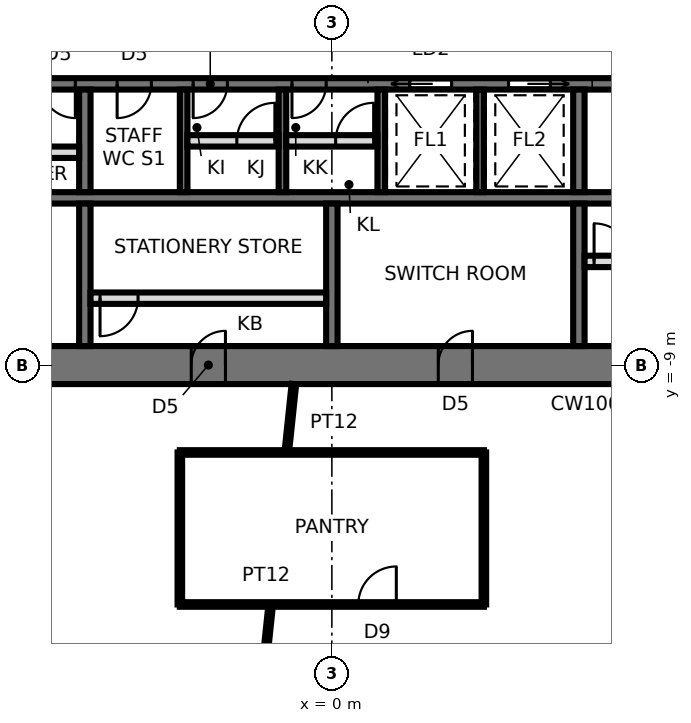
"""IFC4 building model, lengths in metres.
Left out: names, types, materials, properties, quantities, classifications, styles, units other than length and angle.
Written with IfcOpenShell. Run it as: python <this file> out.ifc"""

import sys

from ifc_helpers import new_model, si_unit, direction, frame, frame_2d, origin, place, context, subcontext, project, spatial, rectangle, extrude, element, fill, save


model = new_model("IFC4")
c1 = context("Model", 3, precision=1e-05, world=origin(), true_north=direction((0.0, 1.0)))
c2 = subcontext(c1, "Body", "Model", "MODEL_VIEW")
j1 = project(units=[si_unit("LENGTHUNIT", "METRE"), si_unit("PLANEANGLEUNIT", "RADIAN")], contexts=[c1])
p1 = place(None, origin())
s1 = spatial("IfcSite", under=j1, at=p1, CompositionType="ELEMENT")
p2 = place(p1, origin())
s2 = spatial("IfcBuilding", under=s1, at=p2, CompositionType="ELEMENT")
p3 = place(p2, frame((0.0, 0.0, 251.8)))
s3 = spatial("IfcBuildingStorey", under=s2, at=p3, CompositionType="ELEMENT", Elevation=251.8)
p4 = place(p3, frame((-13.2, -9.0, 0.0), z_axis=(0.0, 0.0, 1.0), x_axis=(1.0, 0.0, 0.0)))
e1 = element("IfcWall", 1, at=p4, inside=s3, PredefinedType="SHEAR", context=c2, shape_type="SweptSolid", body=[
    extrude(rectangle(XDim=26.4, YDim=1.0, at=frame_2d((13.2, 0.0))), origin(), (0.0, 0.0, 1.0), 4.2),
])
p5 = place(p4, frame((2.65, 0.0, 0.0)))
e2 = element("IfcOpeningElement", 2, at=p5, cuts=e1, PredefinedType="OPENING", context=c2, shape_type="SweptSolid", body=[
    extrude(rectangle(XDim=0.9, YDim=2.1, at=frame_2d((0.45, 1.05))), frame((0.0, 0.51, 0.0), z_axis=(0.0, -1.0, 0.0), x_axis=(1.0, 0.0, 0.0)), (0.0, 0.0, 1.0), 1.02),
])
p6 = place(p4, frame((9.5, 0.0, 0.0)))
e3 = element("IfcOpeningElement", 3, at=p6, cuts=e1, PredefinedType="OPENING", context=c2, shape_type="SweptSolid", body=[
    extrude(rectangle(XDim=0.9, YDim=2.1, at=frame_2d((0.45, 1.05))), frame((0.0, 0.51, 0.0), z_axis=(0.0, -1.0, 0.0), x_axis=(1.0, 0.0, 0.0)), (0.0, 0.0, 1.0), 1.02),
])
p7 = place(p4, frame((16.0, 0.0, 0.0)))
e4 = element("IfcOpeningElement", 4, at=p7, cuts=e1, PredefinedType="OPENING", context=c2, shape_type="SweptSolid", body=[
    extrude(rectangle(XDim=0.9, YDim=2.1, at=frame_2d((0.45, 1.05))), frame((0.0, 0.51, 0.0), z_axis=(0.0, -1.0, 0.0), x_axis=(1.0, 0.0, 0.0)), (0.0, 0.0, 1.0), 1.02),
])
p8 = place(p4, frame((22.85, 0.0, 0.0)))
e5 = element("IfcOpeningElement", 5, at=p8, cuts=e1, PredefinedType="OPENING", context=c2, shape_type="SweptSolid", body=[
    extrude(rectangle(XDim=0.9, YDim=2.1, at=frame_2d((0.45, 1.05))), frame((0.0, 0.51, 0.0), z_axis=(0.0, -1.0, 0.0), x_axis=(1.0, 0.0, 0.0)), (0.0, 0.0, 1.0), 1.02),
])
p9 = place(p3, frame((-13.2, -1.6, 0.0), z_axis=(0.0, 0.0, 1.0), x_axis=(1.0, 0.0, 0.0)))
e6 = element("IfcWall", 6, at=p9, inside=s3, PredefinedType="SHEAR", context=c2, shape_type="SweptSolid", body=[
    extrude(rectangle(XDim=26.4, YDim=0.3, at=frame_2d((13.2, 0.0))), origin(), (0.0, 0.0, 1.0), 4.2),
])
p10 = place(p9, frame((25.15, 0.0, 0.0)))
e7 = element("IfcOpeningElement", 7, at=p10, cuts=e6, PredefinedType="OPENING", context=c2, shape_type="SweptSolid", body=[
    extrude(rectangle(XDim=1.0, YDim=2.1, at=frame_2d((0.5, 1.05))), frame((0.0, 0.16, 0.0), z_axis=(0.0, -1.0, 0.0), x_axis=(1.0, 0.0, 0.0)), (0.0, 0.0, 1.0), 0.32),
])
p11 = place(p9, frame((7.55, 0.0, 0.0)))
e8 = element("IfcOpeningElement", 8, at=p11, cuts=e6, PredefinedType="OPENING", context=c2, shape_type="SweptSolid", body=[
    extrude(rectangle(XDim=0.9, YDim=2.1, at=frame_2d((0.45, 1.05))), frame((0.0, 0.16, 0.0), z_axis=(0.0, -1.0, 0.0), x_axis=(1.0, 0.0, 0.0)), (0.0, 0.0, 1.0), 0.32),
])
p12 = place(p9, frame((9.55, 0.0, 0.0)))
e9 = element("IfcOpeningElement", 9, at=p12, cuts=e6, PredefinedType="OPENING", context=c2, shape_type="SweptSolid", body=[
    extrude(rectangle(XDim=0.9, YDim=2.1, at=frame_2d((0.45, 1.05))), frame((0.0, 0.16, 0.0), z_axis=(0.0, -1.0, 0.0), x_axis=(1.0, 0.0, 0.0)), (0.0, 0.0, 1.0), 0.32),
])
p13 = place(p9, frame((12.15, 0.0, 0.0)))
e10 = element("IfcOpeningElement", 10, at=p13, cuts=e6, PredefinedType="OPENING", context=c2, shape_type="SweptSolid", body=[
    extrude(rectangle(XDim=0.9, YDim=2.1, at=frame_2d((0.45, 1.05))), frame((0.0, 0.16, 0.0), z_axis=(0.0, -1.0, 0.0), x_axis=(1.0, 0.0, 0.0)), (0.0, 0.0, 1.0), 0.32),
])
p14 = place(p9, frame((15.25, 0.0, 0.0)))
e11 = element("IfcOpeningElement", 11, at=p14, cuts=e6, PredefinedType="OPENING", context=c2, shape_type="SweptSolid", body=[
    extrude(rectangle(XDim=1.1, YDim=2.3, at=frame_2d((0.55, 1.15))), frame((0.0, 0.16, 0.0), z_axis=(0.0, -1.0, 0.0), x_axis=(1.0, 0.0, 0.0)), (0.0, 0.0, 1.0), 0.32),
])
p15 = place(p9, frame((17.85, 0.0, 0.0)))
e12 = element("IfcOpeningElement", 12, at=p15, cuts=e6, PredefinedType="OPENING", context=c2, shape_type="SweptSolid", body=[
    extrude(rectangle(XDim=1.1, YDim=2.3, at=frame_2d((0.55, 1.15))), frame((0.0, 0.16, 0.0), z_axis=(0.0, -1.0, 0.0), x_axis=(1.0, 0.0, 0.0)), (0.0, 0.0, 1.0), 0.32),
])
p16 = place(p9, frame((5.55, 0.0, 0.0)))
e13 = element("IfcOpeningElement", 13, at=p16, cuts=e6, PredefinedType="OPENING", context=c2, shape_type="SweptSolid", body=[
    extrude(rectangle(XDim=0.9, YDim=2.1, at=frame_2d((0.45, 1.05))), frame((0.0, 0.16, 0.0), z_axis=(0.0, -1.0, 0.0), x_axis=(1.0, 0.0, 0.0)), (0.0, 0.0, 1.0), 0.32),
])
p17 = place(p3, frame((-13.2, -4.6, 0.0), z_axis=(0.0, 0.0, 1.0), x_axis=(1.0, 0.0, 0.0)))
e14 = element("IfcWall", 14, at=p17, inside=s3, PredefinedType="SHEAR", context=c2, shape_type="SweptSolid", body=[
    extrude(rectangle(XDim=26.4, YDim=0.3, at=frame_2d((13.2, 0.0))), origin(), (0.0, 0.0, 1.0), 4.2),
])
p18 = place(p3, frame((-6.5, -1.75, 0.0), z_axis=(0.0, 0.0, 1.0), x_axis=(0.0, -1.0, 0.0)))
e15 = element("IfcWall", 15, at=p18, inside=s3, PredefinedType="SHEAR", context=c2, shape_type="SweptSolid", body=[
    extrude(rectangle(XDim=2.7, YDim=0.3, at=frame_2d((1.35, 0.0))), origin(), (0.0, 0.0, 1.0), 4.2),
])
p19 = place(p3, frame((-6.5, -4.75, 0.0), z_axis=(0.0, 0.0, 1.0), x_axis=(0.0, -1.0, 0.0)))
e16 = element("IfcWall", 16, at=p19, inside=s3, PredefinedType="SHEAR", context=c2, shape_type="SweptSolid", body=[
    extrude(rectangle(XDim=3.75, YDim=0.3, at=frame_2d((1.875, 0.0))), origin(), (0.0, 0.0, 1.0), 4.2),
])
p20 = place(p3, frame((6.5, -1.75, 0.0), z_axis=(0.0, 0.0, 1.0), x_axis=(0.0, -1.0, 0.0)))
e17 = element("IfcWall", 17, at=p20, inside=s3, PredefinedType="SHEAR", context=c2, shape_type="SweptSolid", body=[
    extrude(rectangle(XDim=2.7, YDim=0.3, at=frame_2d((1.35, 0.0))), origin(), (0.0, 0.0, 1.0), 4.2),
])
p21 = place(p3, frame((6.5, -4.75, 0.0), z_axis=(0.0, 0.0, 1.0), x_axis=(0.0, -1.0, 0.0)))
e18 = element("IfcWall", 18, at=p21, inside=s3, PredefinedType="SHEAR", context=c2, shape_type="SweptSolid", body=[
    extrude(rectangle(XDim=3.75, YDim=0.3, at=frame_2d((1.875, 0.0))), origin(), (0.0, 0.0, 1.0), 4.2),
])
for number, where, z_axis, x_axis in (
    (19, (-3.9, -1.75, 0.0), (0.0, 0.0, 1.0), (0.0, -1.0, 0.0)),
    (20, (-1.3, -1.75, 0.0), (0.0, 0.0, 1.0), (0.0, -1.0, 0.0)),
    (21, (1.3, -1.75, 0.0), (0.0, 0.0, 1.0), (0.0, -1.0, 0.0)),
    (22, (3.9, -1.75, 0.0), (0.0, 0.0, 1.0), (0.0, -1.0, 0.0)),
):
    element("IfcWall", number, at=place(p3, frame(where, z_axis=z_axis, x_axis=x_axis)), inside=s3, PredefinedType="SHEAR", context=c2, shape_type="SweptSolid", body=[
        extrude(rectangle(XDim=2.7, YDim=0.2, at=frame_2d((1.35, 0.0))), origin(), (0.0, 0.0, 1.0), 4.2),
    ])
p22 = place(p3, frame((0.0, -4.75, 0.0), z_axis=(0.0, 0.0, 1.0), x_axis=(0.0, -1.0, 0.0)))
e23 = element("IfcWall", 23, at=p22, inside=s3, PredefinedType="SHEAR", context=c2, shape_type="SweptSolid", body=[
    extrude(rectangle(XDim=3.75, YDim=0.3, at=frame_2d((1.875, 0.0))), origin(), (0.0, 0.0, 1.0), 4.2),
])
p23 = place(p3, frame((-3.8, -3.1, 0.0), z_axis=(0.0, 0.0, 1.0), x_axis=(1.0, 0.0, 0.0)))
e24 = element("IfcWall", 24, at=p23, inside=s3, PredefinedType="PARTITIONING", context=c2, shape_type="SweptSolid", body=[
    extrude(rectangle(XDim=2.4, YDim=0.3, at=frame_2d((1.2, 0.0))), origin(), (0.0, 0.0, 1.0), 4.04),
])
p24 = place(p23, frame((1.3, 0.0, 0.0)))
e25 = element("IfcOpeningElement", 25, at=p24, cuts=e24, PredefinedType="OPENING", context=c2, shape_type="SweptSolid", body=[
    extrude(rectangle(XDim=1.0, YDim=2.4, at=frame_2d((0.5, 1.2))), frame((0.0, 0.16, 0.0), z_axis=(0.0, -1.0, 0.0), x_axis=(1.0, 0.0, 0.0)), (0.0, 0.0, 1.0), 0.32),
])
p25 = place(p3, frame((-1.2, -3.1, 0.0), z_axis=(0.0, 0.0, 1.0), x_axis=(1.0, 0.0, 0.0)))
e26 = element("IfcWall", 26, at=p25, inside=s3, PredefinedType="PARTITIONING", context=c2, shape_type="SweptSolid", body=[
    extrude(rectangle(XDim=2.4, YDim=0.3, at=frame_2d((1.2, 0.0))), origin(), (0.0, 0.0, 1.0), 4.04),
])
p26 = place(p25, frame((1.3, 0.0, 0.0)))
e27 = element("IfcOpeningElement", 27, at=p26, cuts=e26, PredefinedType="OPENING", context=c2, shape_type="SweptSolid", body=[
    extrude(rectangle(XDim=1.0, YDim=2.4, at=frame_2d((0.5, 1.2))), frame((0.0, 0.16, 0.0), z_axis=(0.0, -1.0, 0.0), x_axis=(1.0, 0.0, 0.0)), (0.0, 0.0, 1.0), 0.32),
])
p27 = place(p3, frame((-6.35, -7.24, 0.0), z_axis=(0.0, 0.0, 1.0), x_axis=(1.0, 0.0, 0.0)))
e28 = element("IfcWall", 28, at=p27, inside=s3, PredefinedType="PARTITIONING", context=c2, shape_type="SweptSolid", body=[
    extrude(rectangle(XDim=6.2, YDim=0.3, at=frame_2d((3.1, 0.0))), origin(), (0.0, 0.0, 1.0), 4.04),
])
p28 = place(p27, frame((0.25, 0.0, 0.0)))
e29 = element("IfcOpeningElement", 29, at=p28, cuts=e28, PredefinedType="OPENING", context=c2, shape_type="SweptSolid", body=[
    extrude(rectangle(XDim=1.0, YDim=2.4, at=frame_2d((0.5, 1.2))), frame((0.0, 0.16, 0.0), z_axis=(0.0, -1.0, 0.0), x_axis=(1.0, 0.0, 0.0)), (0.0, 0.0, 1.0), 0.32),
])
p29 = place(p3, frame((6.65, -6.272, 0.0), z_axis=(0.0, 0.0, 1.0), x_axis=(1.0, 0.0, 0.0)))
e30 = element("IfcWall", 30, at=p29, inside=s3, PredefinedType="PARTITIONING", context=c2, shape_type="SweptSolid", body=[
    extrude(rectangle(XDim=6.55, YDim=0.3, at=frame_2d((3.275, 0.0))), origin(), (0.0, 0.0, 1.0), 4.04),
])
p30 = place(p29, frame((0.25, 0.0, 0.0)))
e31 = element("IfcOpeningElement", 31, at=p30, cuts=e30, PredefinedType="OPENING", context=c2, shape_type="SweptSolid", body=[
    extrude(rectangle(XDim=1.0, YDim=2.4, at=frame_2d((0.5, 1.2))), frame((0.0, 0.16, 0.0), z_axis=(0.0, -1.0, 0.0), x_axis=(1.0, 0.0, 0.0)), (0.0, 0.0, 1.0), 0.32),
])
p31 = place(p3, frame((-13.2, -3.4, 0.0), z_axis=(0.0, 0.0, 1.0), x_axis=(1.0, 0.0, 0.0)))
e32 = element("IfcWall", 32, at=p31, inside=s3, PredefinedType="SOLIDWALL", context=c2, shape_type="SweptSolid", body=[
    extrude(rectangle(XDim=6.55, YDim=0.3, at=frame_2d((3.275, 0.0))), origin(), (0.0, 0.0, 1.0), 4.04),
])
p32 = place(p31, frame((0.25, 0.0, 0.0)))
e33 = element("IfcOpeningElement", 33, at=p32, cuts=e32, PredefinedType="OPENING", context=c2, shape_type="SweptSolid", body=[
    extrude(rectangle(XDim=0.9, YDim=2.1, at=frame_2d((0.45, 1.05))), frame((0.0, 0.16, 0.0), z_axis=(0.0, -1.0, 0.0), x_axis=(1.0, 0.0, 0.0)), (0.0, 0.0, 1.0), 0.32),
])
p33 = place(p3, frame((-4.0, -11.3, 0.0), z_axis=(0.0, 0.0, 1.0), x_axis=(0.0, -1.0, 0.0)))
e34 = element("IfcWall", 34, at=p33, inside=s3, PredefinedType="PARTITIONING", context=c2, shape_type="SweptSolid", body=[
    extrude(rectangle(XDim=4.0, YDim=0.12, at=frame_2d((2.0, 0.0))), origin(), (0.0, 0.0, 1.0), 4.04),
])
p34 = place(p3, frame((-1.188, -11.3, 0.0), z_axis=(0.0, 0.0, 1.0), x_axis=(0.104537331683, 0.99452096322, 0.0)))
e35 = element("IfcWall", 35, at=p34, inside=s3, PredefinedType="PARTITIONING", context=c2, shape_type="SweptSolid", body=[
    extrude(rectangle(XDim=1.81, YDim=0.12, at=frame_2d((0.905, 0.0))), origin(), (0.0, 0.0, 1.0), 4.04),
])
p35 = place(p3, frame((-2.067, -19.667, 0.0), z_axis=(0.0, 0.0, 1.0), x_axis=(0.104516934496, 0.994523107023, 0.0)))
e36 = element("IfcWall", 36, at=p35, inside=s3, PredefinedType="PARTITIONING", context=c2, shape_type="SweptSolid", body=[
    extrude(rectangle(XDim=4.392, YDim=0.12, at=frame_2d((2.196, 0.0))), origin(), (0.0, 0.0, 1.0), 4.04),
])
p36 = place(p35, frame((1.721, 0.0, 0.0)))
e37 = element("IfcOpeningElement", 37, at=p36, cuts=e36, PredefinedType="OPENING", context=c2, shape_type="SweptSolid", body=[
    extrude(rectangle(XDim=1.0, YDim=2.4, at=frame_2d((0.5, 1.2))), frame((0.0, 0.07, 0.0), z_axis=(0.0, -1.0, 0.0), x_axis=(1.0, 0.0, 0.0)), (0.0, 0.0, 1.0), 0.14),
])
p37 = place(p3, frame((-4.0, -15.3, 0.0), z_axis=(0.0, 0.0, 1.0), x_axis=(1.0, 0.0, 0.0)))
e38 = element("IfcWall", 38, at=p37, inside=s3, PredefinedType="PARTITIONING", context=c2, shape_type="SweptSolid", body=[
    extrude(rectangle(XDim=8.0, YDim=0.12, at=frame_2d((4.0, 0.0))), origin(), (0.0, 0.0, 1.0), 3.637),
])
p38 = place(p37, frame((4.696, 0.0, 0.0)))
e39 = element("IfcOpeningElement", 39, at=p38, cuts=e38, PredefinedType="OPENING", context=c2, shape_type="SweptSolid", body=[
    extrude(rectangle(XDim=1.0, YDim=2.4, at=frame_2d((0.5, 1.2))), frame((0.0, 0.07, 0.0), z_axis=(0.0, -1.0, 0.0), x_axis=(1.0, 0.0, 0.0)), (0.0, 0.0, 1.0), 0.14),
])
p39 = place(p3, frame((4.0, -11.3, 0.0), z_axis=(0.0, 0.0, 1.0), x_axis=(-1.0, 0.0, 0.0)))
e40 = element("IfcWall", 40, at=p39, inside=s3, PredefinedType="PARTITIONING", context=c2, shape_type="SweptSolid", body=[
    extrude(rectangle(XDim=8.0, YDim=0.12, at=frame_2d((4.0, 0.0))), origin(), (0.0, 0.0, 1.0), 4.04),
])
p40 = place(p3, frame((4.0, -15.3, 0.0), z_axis=(0.0, 0.0, 1.0), x_axis=(0.0, 1.0, 0.0)))
e41 = element("IfcWall", 41, at=p40, inside=s3, PredefinedType="PARTITIONING", context=c2, shape_type="SweptSolid", body=[
    extrude(rectangle(XDim=4.0, YDim=0.12, at=frame_2d((2.0, 0.0))), origin(), (0.0, 0.0, 1.0), 4.04),
])
p41 = place(p11, frame((0.9, 0.0, 0.0), z_axis=(0.0, 0.0, 1.0), x_axis=(-1.0, 0.0, 0.0)))
e42 = element("IfcDoor", 42, at=p41, inside=s3, OperationType="SINGLE_SWING_RIGHT", PredefinedType="DOOR", context=c2, shape_type="SweptSolid", body=[
    extrude(rectangle(XDim=0.9, YDim=2.1, at=frame_2d((0.45, 1.05))), frame((0.0, 0.025, 0.0), z_axis=(0.0, -1.0, 0.0), x_axis=(1.0, 0.0, 0.0)), (0.0, 0.0, 1.0), 0.05),
])
fill(e8, e42)
p42 = place(p24, origin())
e43 = element("IfcDoor", 43, at=p42, inside=s3, OperationType="SINGLE_SWING_RIGHT", PredefinedType="DOOR", context=c2, shape_type="SweptSolid", body=[
    extrude(rectangle(XDim=1.0, YDim=2.4, at=frame_2d((0.5, 1.2))), frame((0.0, 0.025, 0.0), z_axis=(0.0, -1.0, 0.0), x_axis=(1.0, 0.0, 0.0)), (0.0, 0.0, 1.0), 0.05),
])
fill(e25, e43)
p43 = place(p12, frame((0.9, 0.0, 0.0), z_axis=(0.0, 0.0, 1.0), x_axis=(-1.0, 0.0, 0.0)))
e44 = element("IfcDoor", 44, at=p43, inside=s3, OperationType="SINGLE_SWING_RIGHT", PredefinedType="DOOR", context=c2, shape_type="SweptSolid", body=[
    extrude(rectangle(XDim=0.9, YDim=2.1, at=frame_2d((0.45, 1.05))), frame((0.0, 0.025, 0.0), z_axis=(0.0, -1.0, 0.0), x_axis=(1.0, 0.0, 0.0)), (0.0, 0.0, 1.0), 0.05),
])
fill(e9, e44)
p44 = place(p26, origin())
e45 = element("IfcDoor", 45, at=p44, inside=s3, OperationType="SINGLE_SWING_RIGHT", PredefinedType="DOOR", context=c2, shape_type="SweptSolid", body=[
    extrude(rectangle(XDim=1.0, YDim=2.4, at=frame_2d((0.5, 1.2))), frame((0.0, 0.025, 0.0), z_axis=(0.0, -1.0, 0.0), x_axis=(1.0, 0.0, 0.0)), (0.0, 0.0, 1.0), 0.05),
])
fill(e27, e45)
p45 = place(p13, frame((0.9, 0.0, 0.0), z_axis=(0.0, 0.0, 1.0), x_axis=(-1.0, 0.0, 0.0)))
e46 = element("IfcDoor", 46, at=p45, inside=s3, OperationType="SINGLE_SWING_RIGHT", PredefinedType="DOOR", context=c2, shape_type="SweptSolid", body=[
    extrude(rectangle(XDim=0.9, YDim=2.1, at=frame_2d((0.45, 1.05))), frame((0.0, 0.025, 0.0), z_axis=(0.0, -1.0, 0.0), x_axis=(1.0, 0.0, 0.0)), (0.0, 0.0, 1.0), 0.05),
])
fill(e10, e46)
p46 = place(p14, frame((1.1, 0.0, 0.0), z_axis=(0.0, 0.0, 1.0), x_axis=(-1.0, 0.0, 0.0)))
e47 = element("IfcDoor", 47, at=p46, inside=s3, OperationType="SLIDING_TO_RIGHT", PredefinedType="DOOR", context=c2, shape_type="SweptSolid", body=[
    extrude(rectangle(XDim=1.1, YDim=2.3, at=frame_2d((0.55, 1.15))), frame((0.0, 0.025, 0.0), z_axis=(0.0, -1.0, 0.0), x_axis=(1.0, 0.0, 0.0)), (0.0, 0.0, 1.0), 0.05),
])
fill(e11, e47)
p47 = place(p15, frame((1.1, 0.0, 0.0), z_axis=(0.0, 0.0, 1.0), x_axis=(-1.0, 0.0, 0.0)))
e48 = element("IfcDoor", 48, at=p47, inside=s3, OperationType="SLIDING_TO_LEFT", PredefinedType="DOOR", context=c2, shape_type="SweptSolid", body=[
    extrude(rectangle(XDim=1.1, YDim=2.3, at=frame_2d((0.55, 1.15))), frame((0.0, 0.025, 0.0), z_axis=(0.0, -1.0, 0.0), x_axis=(1.0, 0.0, 0.0)), (0.0, 0.0, 1.0), 0.05),
])
fill(e12, e48)
p48 = place(p16, frame((0.9, 0.0, 0.0), z_axis=(0.0, 0.0, 1.0), x_axis=(-1.0, 0.0, 0.0)))
e49 = element("IfcDoor", 49, at=p48, inside=s3, OperationType="SINGLE_SWING_LEFT", PredefinedType="DOOR", context=c2, shape_type="SweptSolid", body=[
    extrude(rectangle(XDim=0.9, YDim=2.1, at=frame_2d((0.45, 1.05))), frame((0.0, 0.025, 0.0), z_axis=(0.0, -1.0, 0.0), x_axis=(1.0, 0.0, 0.0)), (0.0, 0.0, 1.0), 0.05),
])
fill(e13, e49)
p49 = place(p6, origin())
e50 = element("IfcDoor", 50, at=p49, inside=s3, OperationType="SINGLE_SWING_RIGHT", PredefinedType="DOOR", context=c2, shape_type="SweptSolid", body=[
    extrude(rectangle(XDim=0.82, YDim=2.06, at=frame_2d((0.45, 1.03))), frame((0.0, 0.025, 0.0), z_axis=(0.0, -1.0, 0.0), x_axis=(1.0, 0.0, 0.0)), (0.0, 0.0, 1.0), 0.05),
    extrude(rectangle(XDim=0.04, YDim=2.1, at=frame_2d((0.02, 1.05))), frame((0.0, 0.25, 0.0), z_axis=(0.0, -1.0, 0.0), x_axis=(1.0, 0.0, 0.0)), (0.0, 0.0, 1.0), 0.5),
    extrude(rectangle(XDim=0.04, YDim=2.1, at=frame_2d((0.88, 1.05))), frame((0.0, 0.25, 0.0), z_axis=(0.0, -1.0, 0.0), x_axis=(1.0, 0.0, 0.0)), (0.0, 0.0, 1.0), 0.5),
    extrude(rectangle(XDim=0.82, YDim=0.04, at=frame_2d((0.45, 2.08))), frame((0.0, 0.25, 0.0), z_axis=(0.0, -1.0, 0.0), x_axis=(1.0, 0.0, 0.0)), (0.0, 0.0, 1.0), 0.5),
])
fill(e3, e50)
p50 = place(p7, origin())
e51 = element("IfcDoor", 51, at=p50, inside=s3, OperationType="SINGLE_SWING_RIGHT", PredefinedType="DOOR", context=c2, shape_type="SweptSolid", body=[
    extrude(rectangle(XDim=0.82, YDim=2.06, at=frame_2d((0.45, 1.03))), frame((0.0, 0.025, 0.0), z_axis=(0.0, -1.0, 0.0), x_axis=(1.0, 0.0, 0.0)), (0.0, 0.0, 1.0), 0.05),
    extrude(rectangle(XDim=0.04, YDim=2.1, at=frame_2d((0.02, 1.05))), frame((0.0, 0.25, 0.0), z_axis=(0.0, -1.0, 0.0), x_axis=(1.0, 0.0, 0.0)), (0.0, 0.0, 1.0), 0.5),
    extrude(rectangle(XDim=0.04, YDim=2.1, at=frame_2d((0.88, 1.05))), frame((0.0, 0.25, 0.0), z_axis=(0.0, -1.0, 0.0), x_axis=(1.0, 0.0, 0.0)), (0.0, 0.0, 1.0), 0.5),
    extrude(rectangle(XDim=0.82, YDim=0.04, at=frame_2d((0.45, 2.08))), frame((0.0, 0.25, 0.0), z_axis=(0.0, -1.0, 0.0), x_axis=(1.0, 0.0, 0.0)), (0.0, 0.0, 1.0), 0.5),
])
fill(e4, e51)
p51 = place(p28, frame((1.0, 0.0, 0.0), z_axis=(0.0, 0.0, 1.0), x_axis=(-1.0, 0.0, 0.0)))
e52 = element("IfcDoor", 52, at=p51, inside=s3, OperationType="SINGLE_SWING_RIGHT", PredefinedType="DOOR", context=c2, shape_type="SweptSolid", body=[
    extrude(rectangle(XDim=1.0, YDim=2.4, at=frame_2d((0.5, 1.2))), frame((0.0, 0.025, 0.0), z_axis=(0.0, -1.0, 0.0), x_axis=(1.0, 0.0, 0.0)), (0.0, 0.0, 1.0), 0.05),
])
fill(e29, e52)
p52 = place(p30, origin())
e53 = element("IfcDoor", 53, at=p52, inside=s3, OperationType="SINGLE_SWING_LEFT", PredefinedType="DOOR", context=c2, shape_type="SweptSolid", body=[
    extrude(rectangle(XDim=1.0, YDim=2.4, at=frame_2d((0.5, 1.2))), frame((0.0, 0.025, 0.0), z_axis=(0.0, -1.0, 0.0), x_axis=(1.0, 0.0, 0.0)), (0.0, 0.0, 1.0), 0.05),
])
fill(e31, e53)
p53 = place(p38, origin())
e54 = element("IfcDoor", 54, at=p53, inside=s3, OperationType="SINGLE_SWING_RIGHT", PredefinedType="DOOR", context=c2, shape_type="SweptSolid", body=[
    extrude(rectangle(XDim=1.0, YDim=2.4, at=frame_2d((0.5, 1.2))), frame((0.0, 0.025, 0.0), z_axis=(0.0, -1.0, 0.0), x_axis=(1.0, 0.0, 0.0)), (0.0, 0.0, 1.0), 0.05),
])
fill(e39, e54)
save(model, sys.argv[1])
